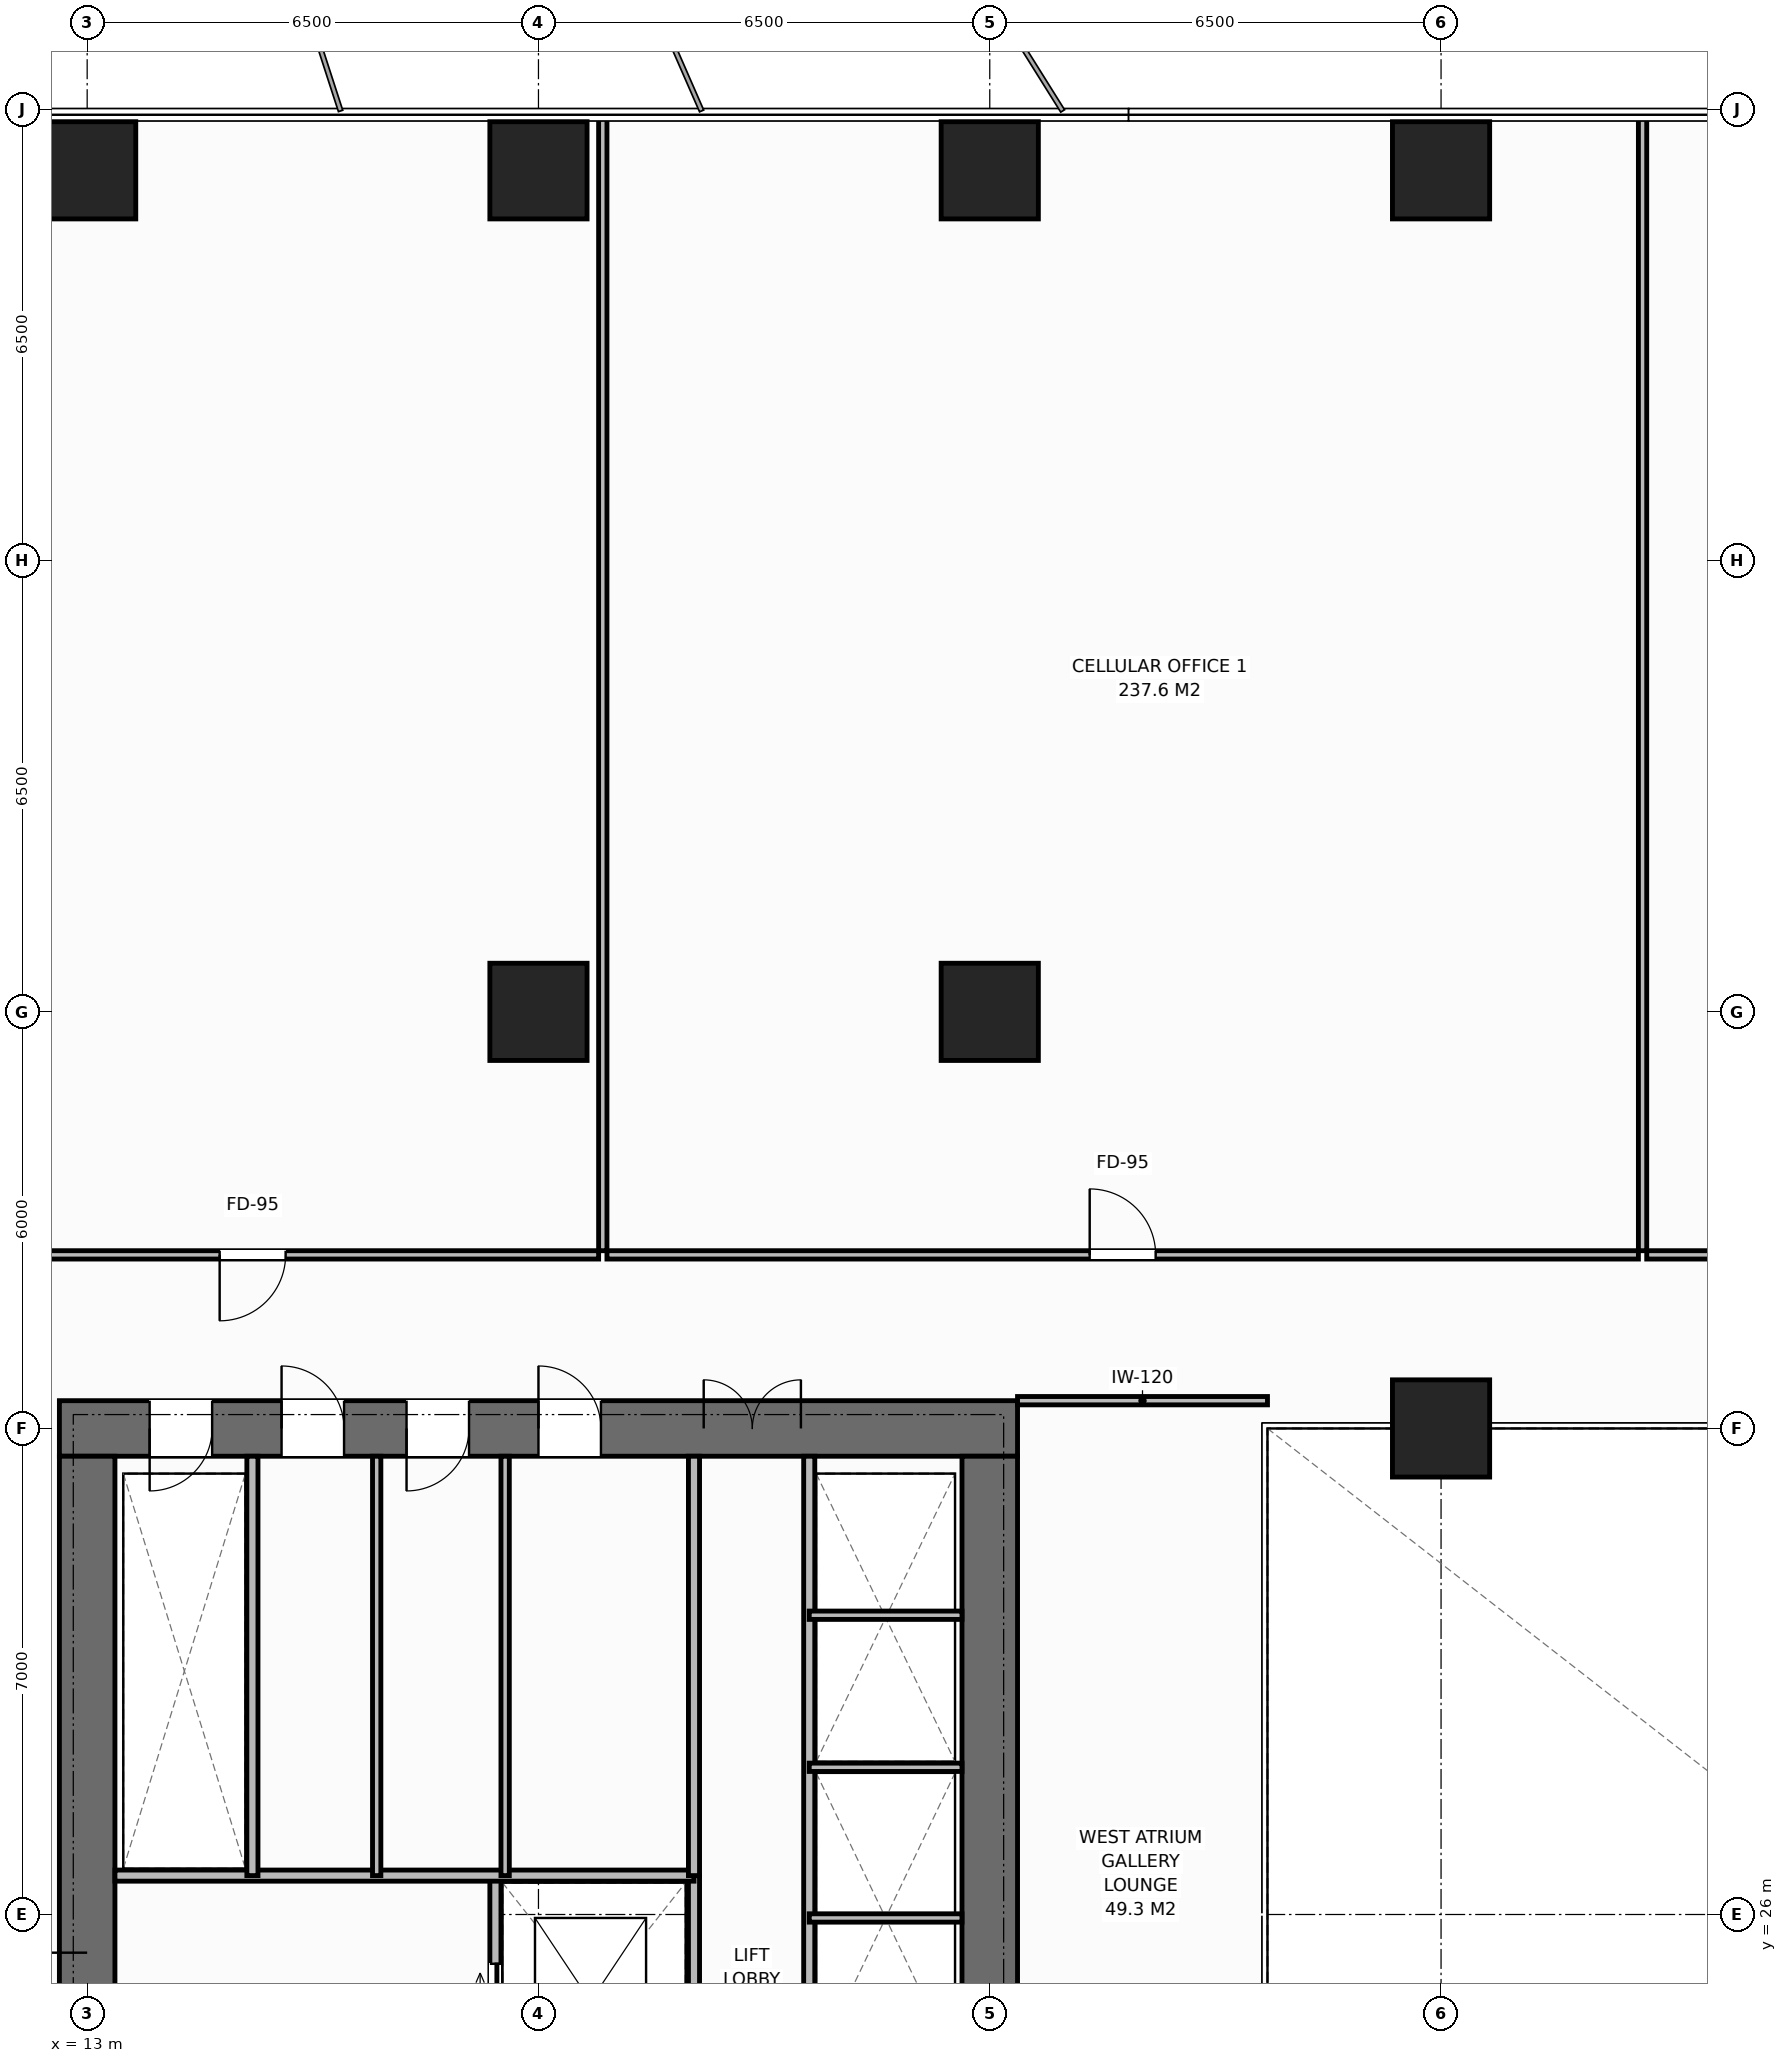
"""IFC4 building model, lengths in metres.
Left out: names, types, materials, properties, quantities, classifications, styles, units other than length and angle.
Written with IfcOpenShell. Run it as: python <this file> out.ifc"""

import sys

from ifc_helpers import new_model, si_unit, direction, frame, frame_2d, origin, origin_2d, place, context, subcontext, project, spatial, rectangle, extrude, element, fill, save


model = new_model("IFC4")
c1 = context("Model", 3, precision=1e-05, world=origin(), true_north=direction((0.0, 1.0)))
c2 = subcontext(c1, "Body", "Model", "MODEL_VIEW")
j1 = project(units=[si_unit("LENGTHUNIT", "METRE"), si_unit("PLANEANGLEUNIT", "RADIAN")], contexts=[c1])
p1 = place(None, origin())
s1 = spatial("IfcSite", under=j1, at=p1, CompositionType="ELEMENT")
p2 = place(p1, origin())
s2 = spatial("IfcBuilding", under=s1, at=p2, CompositionType="ELEMENT")
p3 = place(p2, frame((0.0, 0.0, 39.2)))
s3 = spatial("IfcBuildingStorey", under=s2, at=p3, CompositionType="ELEMENT", Elevation=39.2)
p4 = place(p3, frame((12.6, 33.0, 0.0), z_axis=(0.0, 0.0, 1.0), x_axis=(1.0, 0.0, 0.0)))
e1 = element("IfcWall", 1, at=p4, inside=s3, PredefinedType="SHEAR", context=c2, shape_type="SweptSolid", body=[
    extrude(rectangle(XDim=13.8, YDim=0.8, at=frame_2d((6.9, 0.0))), origin(), (0.0, 0.0, 1.0), 3.8),
])
p5 = place(p4, frame((1.3, 0.0, 0.0)))
e2 = element("IfcOpeningElement", 2, at=p5, cuts=e1, PredefinedType="OPENING", context=c2, shape_type="SweptSolid", body=[
    extrude(rectangle(XDim=0.9, YDim=2.15, at=frame_2d((0.45, 1.075))), frame((0.0, 0.41, 0.0), z_axis=(0.0, -1.0, 0.0), x_axis=(1.0, 0.0, 0.0)), (0.0, 0.0, 1.0), 0.82),
])
p6 = place(p4, frame((3.2, 0.0, 0.0)))
e3 = element("IfcOpeningElement", 3, at=p6, cuts=e1, PredefinedType="OPENING", context=c2, shape_type="SweptSolid", body=[
    extrude(rectangle(XDim=0.9, YDim=2.15, at=frame_2d((0.45, 1.075))), frame((0.0, 0.41, 0.0), z_axis=(0.0, -1.0, 0.0), x_axis=(1.0, 0.0, 0.0)), (0.0, 0.0, 1.0), 0.82),
])
p7 = place(p4, frame((5.0, 0.0, 0.0)))
e4 = element("IfcOpeningElement", 4, at=p7, cuts=e1, PredefinedType="OPENING", context=c2, shape_type="SweptSolid", body=[
    extrude(rectangle(XDim=0.9, YDim=2.15, at=frame_2d((0.45, 1.075))), frame((0.0, 0.41, 0.0), z_axis=(0.0, -1.0, 0.0), x_axis=(1.0, 0.0, 0.0)), (0.0, 0.0, 1.0), 0.82),
])
p8 = place(p4, frame((6.9, 0.0, 0.0)))
e5 = element("IfcOpeningElement", 5, at=p8, cuts=e1, PredefinedType="OPENING", context=c2, shape_type="SweptSolid", body=[
    extrude(rectangle(XDim=0.9, YDim=2.15, at=frame_2d((0.45, 1.075))), frame((0.0, 0.41, 0.0), z_axis=(0.0, -1.0, 0.0), x_axis=(1.0, 0.0, 0.0)), (0.0, 0.0, 1.0), 0.82),
])
p9 = place(p4, frame((9.28, 0.0, 0.0)))
e6 = element("IfcOpeningElement", 6, at=p9, cuts=e1, PredefinedType="OPENING", context=c2, shape_type="SweptSolid", body=[
    extrude(rectangle(XDim=1.4, YDim=2.2, at=frame_2d((0.7, 1.1))), frame((0.0, 0.41, 0.0), z_axis=(0.0, -1.0, 0.0), x_axis=(1.0, 0.0, 0.0)), (0.0, 0.0, 1.0), 0.82),
])
p10 = place(p3, frame((13.0, 19.4, 0.0), z_axis=(0.0, 0.0, 1.0), x_axis=(0.0, 1.0, 0.0)))
e7 = element("IfcWall", 7, at=p10, inside=s3, PredefinedType="SHEAR", context=c2, shape_type="SweptSolid", body=[
    extrude(rectangle(XDim=13.2, YDim=0.8, at=frame_2d((6.6, 0.0))), origin(), (0.0, 0.0, 1.0), 3.8),
])
p11 = place(p10, frame((4.65, 0.0, 0.0)))
e8 = element("IfcOpeningElement", 8, at=p11, cuts=e7, PredefinedType="OPENING", context=c2, shape_type="SweptSolid", body=[
    extrude(rectangle(XDim=1.4, YDim=2.2, at=frame_2d((0.7, 1.1))), frame((0.0, 0.41, 0.0), z_axis=(0.0, -1.0, 0.0), x_axis=(1.0, 0.0, 0.0)), (0.0, 0.0, 1.0), 0.82),
])
p12 = place(p3, frame((26.0, 19.4, 0.0), z_axis=(0.0, 0.0, 1.0), x_axis=(0.0, 1.0, 0.0)))
e9 = element("IfcWall", 9, at=p12, inside=s3, PredefinedType="SHEAR", context=c2, shape_type="SweptSolid", body=[
    extrude(rectangle(XDim=13.2, YDim=0.8, at=frame_2d((6.6, 0.0))), origin(), (0.0, 0.0, 1.0), 3.8),
])
for number, where, z_axis, x_axis in (
    (10, (19.5, 39.0, 0.0), (0.0, 0.0, 1.0), (1.0, 0.0, 0.0)),
    (11, (32.5, 33.0, 0.0), (0.0, 0.0, 1.0), (1.0, 0.0, 0.0)),
    (12, (26.0, 39.0, 0.0), (0.0, 0.0, 1.0), (1.0, 0.0, 0.0)),
    (13, (13.0, 51.12, 0.0), (0.0, 0.0, 1.0), (1.0, 0.0, 0.0)),
    (14, (19.5, 51.12, 0.0), (0.0, 0.0, 1.0), (1.0, 0.0, 0.0)),
    (15, (26.0, 51.12, 0.0), (0.0, 0.0, 1.0), (1.0, 0.0, 0.0)),
    (16, (32.5, 51.12, 0.0), (0.0, 0.0, 1.0), (1.0, 0.0, 0.0)),
):
    element("IfcColumn", number, at=place(p3, frame(where, z_axis=z_axis, x_axis=x_axis)), inside=s3, PredefinedType="COLUMN", context=c2, shape_type="SweptSolid", body=[
        extrude(rectangle(XDim=1.4, YDim=1.4, at=origin_2d()), origin(), (0.0, 0.0, 1.0), 3.8),
    ])
p13 = place(p3, frame((21.74, 23.09, 0.0), z_axis=(0.0, 0.0, 1.0), x_axis=(0.0, 1.0, 0.0)))
e17 = element("IfcWall", 17, at=p13, inside=s3, PredefinedType="STANDARD", context=c2, shape_type="SweptSolid", body=[
    extrude(rectangle(XDim=3.47, YDim=0.16, at=frame_2d((1.735, 0.0))), origin(), (0.0, 0.0, 1.0), 3.55),
])
p14 = place(p3, frame((18.88, 23.09, 0.0), z_axis=(0.0, 0.0, 1.0), x_axis=(0.0, 1.0, 0.0)))
e18 = element("IfcWall", 18, at=p14, inside=s3, PredefinedType="STANDARD", context=c2, shape_type="SweptSolid", body=[
    extrude(rectangle(XDim=3.47, YDim=0.16, at=frame_2d((1.735, 0.0))), origin(), (0.0, 0.0, 1.0), 3.55),
])
p15 = place(p14, frame((1.1, 0.0, 0.0)))
e19 = element("IfcOpeningElement", 19, at=p15, cuts=e18, PredefinedType="OPENING", context=c2, shape_type="SweptSolid", body=[
    extrude(rectangle(XDim=1.1, YDim=2.2, at=frame_2d((0.55, 1.1))), frame((0.0, 0.09, 0.0), z_axis=(0.0, -1.0, 0.0), x_axis=(1.0, 0.0, 0.0)), (0.0, 0.0, 1.0), 0.18),
])
p16 = place(p3, frame((13.4, 26.56, 0.0), z_axis=(0.0, 0.0, 1.0), x_axis=(1.0, 0.0, 0.0)))
e20 = element("IfcWall", 20, at=p16, inside=s3, PredefinedType="STANDARD", context=c2, shape_type="SweptSolid", body=[
    extrude(rectangle(XDim=8.34, YDim=0.16, at=frame_2d((4.17, 0.0))), origin(), (0.0, 0.0, 1.0), 3.55),
])
p17 = place(p3, frame((15.38, 26.56, 0.0), z_axis=(0.0, 0.0, 1.0), x_axis=(0.0, 1.0, 0.0)))
e21 = element("IfcWall", 21, at=p17, inside=s3, PredefinedType="STANDARD", context=c2, shape_type="SweptSolid", body=[
    extrude(rectangle(XDim=6.04, YDim=0.16, at=frame_2d((3.02, 0.0))), origin(), (0.0, 0.0, 1.0), 3.55),
])
for number, where, z_axis, x_axis in (
    (22, (17.17, 26.56, 0.0), (0.0, 0.0, 1.0), (0.0, 1.0, 0.0)),
    (23, (19.02, 26.56, 0.0), (0.0, 0.0, 1.0), (0.0, 1.0, 0.0)),
):
    element("IfcWall", number, at=place(p3, frame(where, z_axis=z_axis, x_axis=x_axis)), inside=s3, PredefinedType="PARTITIONING", context=c2, shape_type="SweptSolid", body=[
        extrude(rectangle(XDim=6.04, YDim=0.12, at=frame_2d((3.02, 0.0))), origin(), (0.0, 0.0, 1.0), 3.55),
    ])
p18 = place(p3, frame((21.74, 26.56, 0.0), z_axis=(0.0, 0.0, 1.0), x_axis=(0.0, 1.0, 0.0)))
e24 = element("IfcWall", 24, at=p18, inside=s3, PredefinedType="STANDARD", context=c2, shape_type="SweptSolid", body=[
    extrude(rectangle(XDim=6.04, YDim=0.16, at=frame_2d((3.02, 0.0))), origin(), (0.0, 0.0, 1.0), 3.55),
])
p19 = place(p3, frame((23.4, 19.4, 0.0), z_axis=(0.0, 0.0, 1.0), x_axis=(0.0, 1.0, 0.0)))
e25 = element("IfcWall", 25, at=p19, inside=s3, PredefinedType="STANDARD", context=c2, shape_type="SweptSolid", body=[
    extrude(rectangle(XDim=13.2, YDim=0.16, at=frame_2d((6.6, 0.0))), origin(), (0.0, 0.0, 1.0), 3.55),
])
p20 = place(p19, frame((0.55, 0.0, 0.0)))
e26 = element("IfcOpeningElement", 26, at=p20, cuts=e25, PredefinedType="OPENING", context=c2, shape_type="SweptSolid", body=[
    extrude(rectangle(XDim=1.1, YDim=2.2, at=frame_2d((0.55, 1.1))), frame((0.0, 0.09, 0.0), z_axis=(0.0, -1.0, 0.0), x_axis=(1.0, 0.0, 0.0)), (0.0, 0.0, 1.0), 0.18),
])
p21 = place(p19, frame((2.7, 0.0, 0.0)))
e27 = element("IfcOpeningElement", 27, at=p21, cuts=e25, PredefinedType="OPENING", context=c2, shape_type="SweptSolid", body=[
    extrude(rectangle(XDim=1.1, YDim=2.2, at=frame_2d((0.55, 1.1))), frame((0.0, 0.09, 0.0), z_axis=(0.0, -1.0, 0.0), x_axis=(1.0, 0.0, 0.0)), (0.0, 0.0, 1.0), 0.18),
])
for number, where, z_axis, x_axis in (
    (28, (23.4, 25.95, 0.0), (0.0, 0.0, 1.0), (1.0, 0.0, 0.0)),
    (29, (23.4, 28.12, 0.0), (0.0, 0.0, 1.0), (1.0, 0.0, 0.0)),
    (30, (23.4, 30.31, 0.0), (0.0, 0.0, 1.0), (1.0, 0.0, 0.0)),
):
    element("IfcWall", number, at=place(p3, frame(where, z_axis=z_axis, x_axis=x_axis)), inside=s3, PredefinedType="PARTITIONING", context=c2, shape_type="SweptSolid", body=[
        extrude(rectangle(XDim=2.2, YDim=0.12, at=frame_2d((1.1, 0.0))), origin(), (0.0, 0.0, 1.0), 3.55),
    ])
p22 = place(p3, frame((26.4, 33.4, 0.0), z_axis=(0.0, 0.0, 1.0), x_axis=(1.0, 0.0, 0.0)))
e31 = element("IfcWall", 31, at=p22, inside=s3, PredefinedType="PARTITIONING", context=c2, shape_type="SweptSolid", body=[
    extrude(rectangle(XDim=3.6, YDim=0.12, at=frame_2d((1.8, 0.0))), origin(), (0.0, 0.0, 1.0), 3.55),
])
p23 = place(p3, frame((20.427, 35.56, 0.0), z_axis=(0.0, 0.0, 1.0), x_axis=(0.0, 1.0, 0.0)))
e32 = element("IfcWall", 32, at=p23, inside=s3, PredefinedType="PARTITIONING", context=c2, shape_type="SweptSolid", body=[
    extrude(rectangle(XDim=16.42, YDim=0.12, at=frame_2d((8.21, 0.0))), origin(), (0.0, 0.0, 1.0), 3.55),
])
p24 = place(p3, frame((-0.02, 35.5, 0.0), z_axis=(0.0, 0.0, 1.0), x_axis=(1.0, 0.0, 0.0)))
e33 = element("IfcWall", 33, at=p24, inside=s3, PredefinedType="PARTITIONING", context=c2, shape_type="SweptSolid", body=[
    extrude(rectangle(XDim=20.386, YDim=0.12, at=frame_2d((10.193, 0.0))), origin(), (0.0, 0.0, 1.0), 3.55),
])
p25 = place(p24, frame((14.928, 0.0, 0.0)))
e34 = element("IfcOpeningElement", 34, at=p25, cuts=e33, PredefinedType="OPENING", context=c2, shape_type="SweptSolid", body=[
    extrude(rectangle(XDim=0.95, YDim=2.15, at=frame_2d((0.475, 1.075))), frame((0.0, 0.07, 0.0), z_axis=(0.0, -1.0, 0.0), x_axis=(1.0, 0.0, 0.0)), (0.0, 0.0, 1.0), 0.14),
])
p26 = place(p3, frame((35.402, 35.56, 0.0), z_axis=(0.0, 0.0, 1.0), x_axis=(0.0, 1.0, 0.0)))
e35 = element("IfcWall", 35, at=p26, inside=s3, PredefinedType="PARTITIONING", context=c2, shape_type="SweptSolid", body=[
    extrude(rectangle(XDim=16.42, YDim=0.12, at=frame_2d((8.21, 0.0))), origin(), (0.0, 0.0, 1.0), 3.55),
])
p27 = place(p3, frame((20.487, 35.5, 0.0), z_axis=(0.0, 0.0, 1.0), x_axis=(1.0, 0.0, 0.0)))
e36 = element("IfcWall", 36, at=p27, inside=s3, PredefinedType="PARTITIONING", context=c2, shape_type="SweptSolid", body=[
    extrude(rectangle(XDim=14.856, YDim=0.12, at=frame_2d((7.428, 0.0))), origin(), (0.0, 0.0, 1.0), 3.55),
])
p28 = place(p27, frame((6.953, 0.0, 0.0)))
e37 = element("IfcOpeningElement", 37, at=p28, cuts=e36, PredefinedType="OPENING", context=c2, shape_type="SweptSolid", body=[
    extrude(rectangle(XDim=0.95, YDim=2.15, at=frame_2d((0.475, 1.075))), frame((0.0, 0.07, 0.0), z_axis=(0.0, -1.0, 0.0), x_axis=(1.0, 0.0, 0.0)), (0.0, 0.0, 1.0), 0.14),
])
p29 = place(p3, frame((35.462, 35.5, 0.0), z_axis=(0.0, 0.0, 1.0), x_axis=(1.0, 0.0, 0.0)))
e38 = element("IfcWall", 38, at=p29, inside=s3, PredefinedType="PARTITIONING", context=c2, shape_type="SweptSolid", body=[
    extrude(rectangle(XDim=23.058, YDim=0.12, at=frame_2d((11.529, 0.0))), origin(), (0.0, 0.0, 1.0), 3.55),
])
p30 = place(p29, frame((11.054, 0.0, 0.0)))
e39 = element("IfcOpeningElement", 39, at=p30, cuts=e38, PredefinedType="OPENING", context=c2, shape_type="SweptSolid", body=[
    extrude(rectangle(XDim=0.95, YDim=2.15, at=frame_2d((0.475, 1.075))), frame((0.0, 0.07, 0.0), z_axis=(0.0, -1.0, 0.0), x_axis=(1.0, 0.0, 0.0)), (0.0, 0.0, 1.0), 0.14),
])
p31 = place(p11, origin())
e40 = element("IfcDoor", 40, at=p31, inside=s3, OperationType="DOUBLE_DOOR_SINGLE_SWING", PredefinedType="DOOR", context=c2, shape_type="SweptSolid", body=[
    extrude(rectangle(XDim=1.4, YDim=2.2, at=frame_2d((0.7, 1.1))), frame((0.0, 0.025, 0.0), z_axis=(0.0, -1.0, 0.0), x_axis=(1.0, 0.0, 0.0)), (0.0, 0.0, 1.0), 0.05),
])
fill(e8, e40)
p32 = place(p15, origin())
e41 = element("IfcDoor", 41, at=p32, inside=s3, OperationType="DOUBLE_DOOR_SLIDING", PredefinedType="DOOR", context=c2, shape_type="SweptSolid", body=[
    extrude(rectangle(XDim=1.1, YDim=2.2, at=frame_2d((0.55, 1.1))), frame((0.0, 0.025, 0.0), z_axis=(0.0, -1.0, 0.0), x_axis=(1.0, 0.0, 0.0)), (0.0, 0.0, 1.0), 0.05),
])
fill(e19, e41)
p33 = place(p5, origin())
e42 = element("IfcDoor", 42, at=p33, inside=s3, OperationType="SINGLE_SWING_RIGHT", PredefinedType="DOOR", context=c2, shape_type="SweptSolid", body=[
    extrude(rectangle(XDim=0.9, YDim=2.15, at=frame_2d((0.45, 1.075))), frame((0.0, -0.075, 0.0), z_axis=(0.0, -1.0, 0.0), x_axis=(1.0, 0.0, 0.0)), (0.0, 0.0, 1.0), 0.05),
])
fill(e2, e42)
p34 = place(p6, origin())
e43 = element("IfcDoor", 43, at=p34, inside=s3, OperationType="SINGLE_SWING_LEFT", PredefinedType="DOOR", context=c2, shape_type="SweptSolid", body=[
    extrude(rectangle(XDim=0.9, YDim=2.15, at=frame_2d((0.45, 1.075))), frame((0.0, -0.075, 0.0), z_axis=(0.0, -1.0, 0.0), x_axis=(1.0, 0.0, 0.0)), (0.0, 0.0, 1.0), 0.05),
])
fill(e3, e43)
p35 = place(p7, origin())
e44 = element("IfcDoor", 44, at=p35, inside=s3, OperationType="SINGLE_SWING_RIGHT", PredefinedType="DOOR", context=c2, shape_type="SweptSolid", body=[
    extrude(rectangle(XDim=0.9, YDim=2.15, at=frame_2d((0.45, 1.075))), frame((0.0, -0.075, 0.0), z_axis=(0.0, -1.0, 0.0), x_axis=(1.0, 0.0, 0.0)), (0.0, 0.0, 1.0), 0.05),
])
fill(e4, e44)
p36 = place(p8, origin())
e45 = element("IfcDoor", 45, at=p36, inside=s3, OperationType="SINGLE_SWING_LEFT", PredefinedType="DOOR", context=c2, shape_type="SweptSolid", body=[
    extrude(rectangle(XDim=0.9, YDim=2.15, at=frame_2d((0.45, 1.075))), frame((0.0, -0.075, 0.0), z_axis=(0.0, -1.0, 0.0), x_axis=(1.0, 0.0, 0.0)), (0.0, 0.0, 1.0), 0.05),
])
fill(e5, e45)
p37 = place(p9, origin())
e46 = element("IfcDoor", 46, at=p37, inside=s3, OperationType="DOUBLE_DOOR_SINGLE_SWING", PredefinedType="DOOR", context=c2, shape_type="SweptSolid", body=[
    extrude(rectangle(XDim=1.4, YDim=2.2, at=frame_2d((0.7, 1.1))), frame((0.0, -0.075, 0.0), z_axis=(0.0, -1.0, 0.0), x_axis=(1.0, 0.0, 0.0)), (0.0, 0.0, 1.0), 0.05),
])
fill(e6, e46)
p38 = place(p25, origin())
e47 = element("IfcDoor", 47, at=p38, inside=s3, OperationType="SINGLE_SWING_RIGHT", PredefinedType="DOOR", context=c2, shape_type="SweptSolid", body=[
    extrude(rectangle(XDim=0.95, YDim=2.15, at=frame_2d((0.475, 1.075))), frame((0.0, 0.025, 0.0), z_axis=(0.0, -1.0, 0.0), x_axis=(1.0, 0.0, 0.0)), (0.0, 0.0, 1.0), 0.05),
])
fill(e34, e47)
p39 = place(p28, origin())
e48 = element("IfcDoor", 48, at=p39, inside=s3, OperationType="SINGLE_SWING_LEFT", PredefinedType="DOOR", context=c2, shape_type="SweptSolid", body=[
    extrude(rectangle(XDim=0.95, YDim=2.15, at=frame_2d((0.475, 1.075))), frame((0.0, 0.025, 0.0), z_axis=(0.0, -1.0, 0.0), x_axis=(1.0, 0.0, 0.0)), (0.0, 0.0, 1.0), 0.05),
])
fill(e37, e48)
save(model, sys.argv[1])
